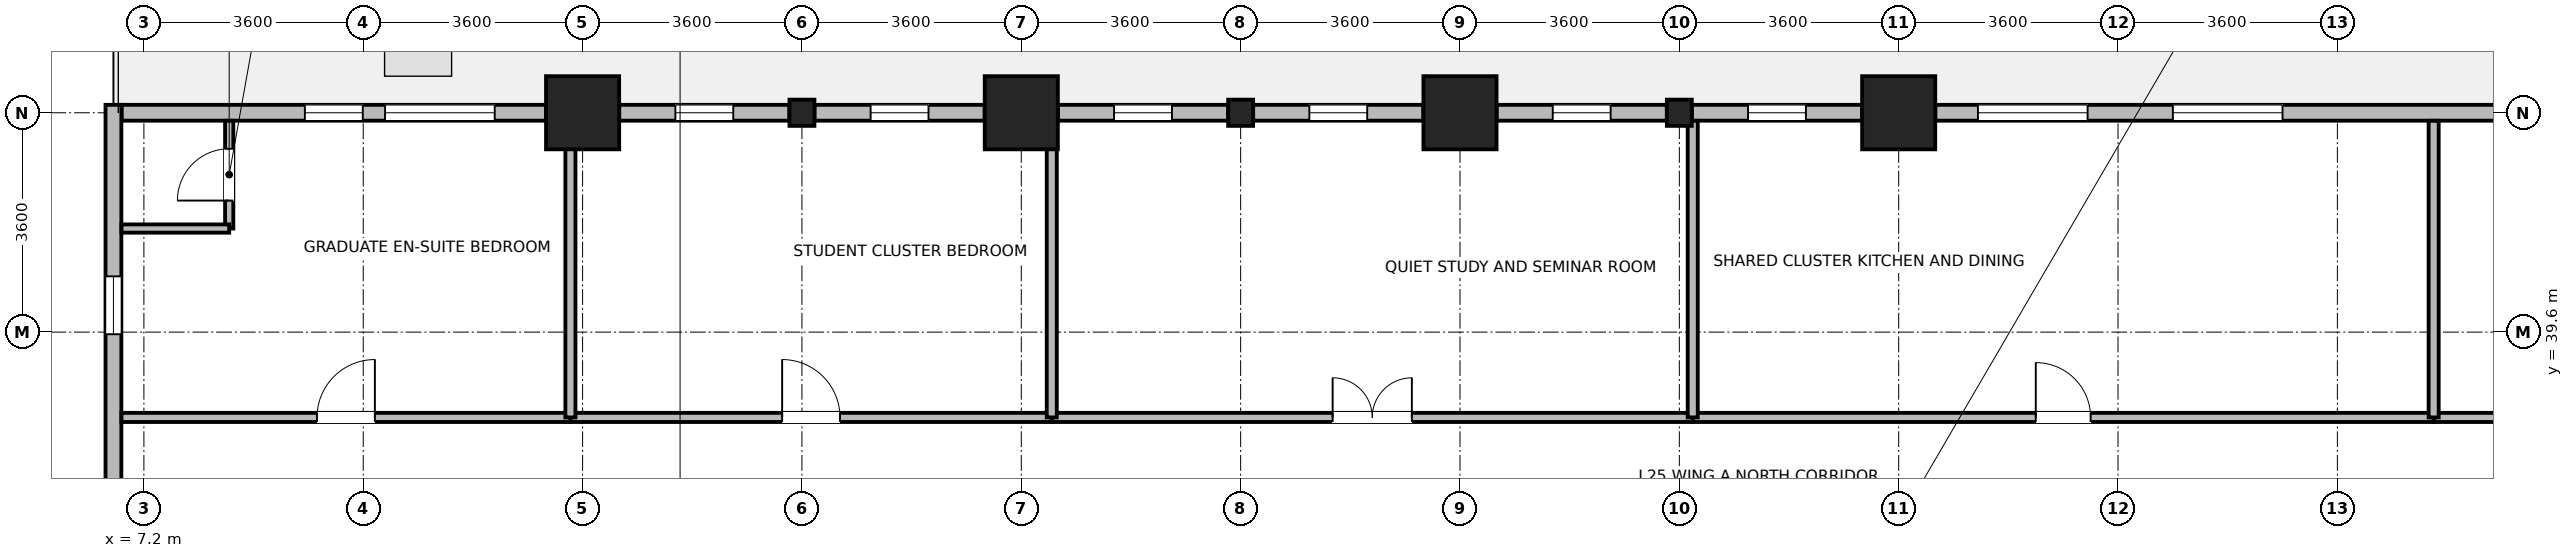
"""IFC4 building model, lengths in metres.
Left out: names, types, materials, properties, quantities, classifications, styles, units other than length and angle.
Written with IfcOpenShell. Run it as: python <this file> out.ifc"""

import sys

from ifc_helpers import new_model, si_unit, direction, frame, frame_2d, origin, origin_2d, place, context, subcontext, project, spatial, rectangle, i_section, extrude, source, transform, mapped, element, fill, save


model = new_model("IFC4")
c1 = context("Model", 3, precision=1e-05, world=origin(), true_north=direction((0.0, 1.0)))
c2 = subcontext(c1, "Body", "Model", "MODEL_VIEW")
j1 = project(units=[si_unit("LENGTHUNIT", "METRE"), si_unit("PLANEANGLEUNIT", "RADIAN")], contexts=[c1])
p1 = place(None, origin())
s1 = spatial("IfcSite", under=j1, at=p1, CompositionType="ELEMENT")
p2 = place(p1, origin())
s2 = spatial("IfcBuilding", under=s1, at=p2, CompositionType="ELEMENT")
p3 = place(p2, frame((0.0, 0.0, 100.8)))
s3 = spatial("IfcBuildingStorey", under=s2, at=p3, CompositionType="ELEMENT", Elevation=100.8)
m1 = source(origin(), c2, "Body", "SweptSolid", [
    extrude(rectangle(XDim=1.2, YDim=1.2, at=origin_2d()), origin(), (0.0, 0.0, 1.0), 3.7),
])
for number, where, z_axis, x_axis in (
    (1, (14.4, 43.2, 0.0), (0.0, 0.0, 1.0), (1.0, 0.0, 0.0)),
    (2, (21.6, 43.2, 0.0), (0.0, 0.0, 1.0), (1.0, 0.0, 0.0)),
    (3, (28.8, 43.2, 0.0), (0.0, 0.0, 1.0), (1.0, 0.0, 0.0)),
    (4, (36.0, 43.2, 0.0), (0.0, 0.0, 1.0), (1.0, 0.0, 0.0)),
):
    element("IfcColumn", number, at=place(p3, frame(where, z_axis=z_axis, x_axis=x_axis)), inside=s3, PredefinedType="COLUMN", context=c2, shape_type="MappedRepresentation", body=[
        mapped(m1, transform((0.0, 0.0, 0.0), x_axis=(1.0, 0.0, 0.0), y_axis=(0.0, 1.0, 0.0), z_axis=(0.0, 0.0, 1.0), scale=1.0)),
    ])
m2 = source(origin(), c2, "Body", "SweptSolid", [
    extrude(i_section(OverallWidth=0.409, OverallDepth=0.43, WebThickness=0.024, FlangeThickness=0.033, FilletRadius=0.015, at=origin_2d()), origin(), (0.0, 0.0, 1.0), 3.7),
])
for number, where, z_axis, x_axis in (
    (5, (18.0, 43.2, 0.0), (0.0, 0.0, 1.0), (1.0, 0.0, 0.0)),
    (6, (25.2, 43.2, 0.0), (0.0, 0.0, 1.0), (1.0, 0.0, 0.0)),
    (7, (32.4, 43.2, 0.0), (0.0, 0.0, 1.0), (1.0, 0.0, 0.0)),
):
    element("IfcColumn", number, at=place(p3, frame(where, z_axis=z_axis, x_axis=x_axis)), inside=s3, PredefinedType="COLUMN", context=c2, shape_type="MappedRepresentation", body=[
        mapped(m2, transform((0.0, 0.0, 0.0), x_axis=(1.0, 0.0, 0.0), y_axis=(0.0, 1.0, 0.0), z_axis=(0.0, 0.0, 1.0), scale=1.0)),
    ])
p4 = place(p3, frame((36.601, 43.2, 0.0), z_axis=(0.0, 0.0, 1.0), x_axis=(1.0, 0.0, 0.0)))
e8 = element("IfcWall", 8, at=p4, inside=s3, PredefinedType="STANDARD", context=c2, shape_type="SweptSolid", body=[
    extrude(rectangle(XDim=9.598, YDim=0.26, at=frame_2d((4.799, 0.0))), origin(), (0.0, 0.0, 1.0), 2.98),
])
p5 = place(p4, frame((0.7, 0.0, 0.85)))
e9 = element("IfcOpeningElement", 9, at=p5, cuts=e8, PredefinedType="OPENING", context=c2, shape_type="SweptSolid", body=[
    extrude(rectangle(XDim=1.8, YDim=1.85, at=frame_2d((0.9, 0.925))), frame((0.0, 0.14, 0.0), z_axis=(0.0, -1.0, 0.0), x_axis=(1.0, 0.0, 0.0)), (0.0, 0.0, 1.0), 0.28),
])
p6 = place(p4, frame((3.899, 0.0, 0.85)))
e10 = element("IfcOpeningElement", 10, at=p6, cuts=e8, PredefinedType="OPENING", context=c2, shape_type="SweptSolid", body=[
    extrude(rectangle(XDim=1.8, YDim=1.85, at=frame_2d((0.9, 0.925))), frame((0.0, 0.14, 0.0), z_axis=(0.0, -1.0, 0.0), x_axis=(1.0, 0.0, 0.0)), (0.0, 0.0, 1.0), 0.28),
])
p7 = place(p3, frame((32.605, 43.2, 0.0), z_axis=(0.0, 0.0, 1.0), x_axis=(1.0, 0.0, 0.0)))
e11 = element("IfcWall", 11, at=p7, inside=s3, PredefinedType="STANDARD", context=c2, shape_type="SweptSolid", body=[
    extrude(rectangle(XDim=2.793, YDim=0.26, at=frame_2d((1.397, 0.0))), origin(), (0.0, 0.0, 1.0), 2.98),
])
p8 = place(p7, frame((0.922, 0.0, 0.85)))
e12 = element("IfcOpeningElement", 12, at=p8, cuts=e11, PredefinedType="OPENING", context=c2, shape_type="SweptSolid", body=[
    extrude(rectangle(XDim=0.95, YDim=1.75, at=frame_2d((0.475, 0.875))), frame((0.0, 0.14, 0.0), z_axis=(0.0, -1.0, 0.0), x_axis=(1.0, 0.0, 0.0)), (0.0, 0.0, 1.0), 0.28),
])
p9 = place(p3, frame((29.401, 43.2, 0.0), z_axis=(0.0, 0.0, 1.0), x_axis=(1.0, 0.0, 0.0)))
e13 = element("IfcWall", 13, at=p9, inside=s3, PredefinedType="STANDARD", context=c2, shape_type="SweptSolid", body=[
    extrude(rectangle(XDim=2.794, YDim=0.26, at=frame_2d((1.397, 0.0))), origin(), (0.0, 0.0, 1.0), 2.98),
])
p10 = place(p9, frame((0.922, 0.0, 0.85)))
e14 = element("IfcOpeningElement", 14, at=p10, cuts=e13, PredefinedType="OPENING", context=c2, shape_type="SweptSolid", body=[
    extrude(rectangle(XDim=0.95, YDim=1.75, at=frame_2d((0.475, 0.875))), frame((0.0, 0.14, 0.0), z_axis=(0.0, -1.0, 0.0), x_axis=(1.0, 0.0, 0.0)), (0.0, 0.0, 1.0), 0.28),
])
p11 = place(p3, frame((25.406, 43.2, 0.0), z_axis=(0.0, 0.0, 1.0), x_axis=(1.0, 0.0, 0.0)))
e15 = element("IfcWall", 15, at=p11, inside=s3, PredefinedType="STANDARD", context=c2, shape_type="SweptSolid", body=[
    extrude(rectangle(XDim=2.793, YDim=0.26, at=frame_2d((1.397, 0.0))), origin(), (0.0, 0.0, 1.0), 2.98),
])
p12 = place(p11, frame((0.922, 0.0, 0.85)))
e16 = element("IfcOpeningElement", 16, at=p12, cuts=e15, PredefinedType="OPENING", context=c2, shape_type="SweptSolid", body=[
    extrude(rectangle(XDim=0.95, YDim=1.75, at=frame_2d((0.475, 0.875))), frame((0.0, 0.14, 0.0), z_axis=(0.0, -1.0, 0.0), x_axis=(1.0, 0.0, 0.0)), (0.0, 0.0, 1.0), 0.28),
])
p13 = place(p3, frame((22.201, 43.2, 0.0), z_axis=(0.0, 0.0, 1.0), x_axis=(1.0, 0.0, 0.0)))
e17 = element("IfcWall", 17, at=p13, inside=s3, PredefinedType="STANDARD", context=c2, shape_type="SweptSolid", body=[
    extrude(rectangle(XDim=2.793, YDim=0.26, at=frame_2d((1.397, 0.0))), origin(), (0.0, 0.0, 1.0), 2.98),
])
p14 = place(p13, frame((0.922, 0.0, 0.85)))
e18 = element("IfcOpeningElement", 18, at=p14, cuts=e17, PredefinedType="OPENING", context=c2, shape_type="SweptSolid", body=[
    extrude(rectangle(XDim=0.95, YDim=1.75, at=frame_2d((0.475, 0.875))), frame((0.0, 0.14, 0.0), z_axis=(0.0, -1.0, 0.0), x_axis=(1.0, 0.0, 0.0)), (0.0, 0.0, 1.0), 0.28),
])
p15 = place(p3, frame((18.206, 43.2, 0.0), z_axis=(0.0, 0.0, 1.0), x_axis=(1.0, 0.0, 0.0)))
e19 = element("IfcWall", 19, at=p15, inside=s3, PredefinedType="STANDARD", context=c2, shape_type="SweptSolid", body=[
    extrude(rectangle(XDim=2.793, YDim=0.26, at=frame_2d((1.397, 0.0))), origin(), (0.0, 0.0, 1.0), 2.98),
])
p16 = place(p15, frame((0.922, 0.0, 0.85)))
e20 = element("IfcOpeningElement", 20, at=p16, cuts=e19, PredefinedType="OPENING", context=c2, shape_type="SweptSolid", body=[
    extrude(rectangle(XDim=0.95, YDim=1.75, at=frame_2d((0.475, 0.875))), frame((0.0, 0.14, 0.0), z_axis=(0.0, -1.0, 0.0), x_axis=(1.0, 0.0, 0.0)), (0.0, 0.0, 1.0), 0.28),
])
p17 = place(p3, frame((15.001, 43.2, 0.0), z_axis=(0.0, 0.0, 1.0), x_axis=(1.0, 0.0, 0.0)))
e21 = element("IfcWall", 21, at=p17, inside=s3, PredefinedType="STANDARD", context=c2, shape_type="SweptSolid", body=[
    extrude(rectangle(XDim=2.793, YDim=0.26, at=frame_2d((1.397, 0.0))), origin(), (0.0, 0.0, 1.0), 2.98),
])
p18 = place(p17, frame((0.922, 0.0, 0.85)))
e22 = element("IfcOpeningElement", 22, at=p18, cuts=e21, PredefinedType="OPENING", context=c2, shape_type="SweptSolid", body=[
    extrude(rectangle(XDim=0.95, YDim=1.75, at=frame_2d((0.475, 0.875))), frame((0.0, 0.14, 0.0), z_axis=(0.0, -1.0, 0.0), x_axis=(1.0, 0.0, 0.0)), (0.0, 0.0, 1.0), 0.28),
])
p19 = place(p3, frame((6.835, 43.2, 0.0), z_axis=(0.0, 0.0, 1.0), x_axis=(1.0, 0.0, 0.0)))
e23 = element("IfcWall", 23, at=p19, inside=s3, PredefinedType="STANDARD", context=c2, shape_type="SweptSolid", body=[
    extrude(rectangle(XDim=6.964, YDim=0.26, at=frame_2d((3.482, 0.0))), origin(), (0.0, 0.0, 1.0), 3.43),
])
p20 = place(p19, frame((4.323, 0.0, 0.85)))
e24 = element("IfcOpeningElement", 24, at=p20, cuts=e23, PredefinedType="OPENING", context=c2, shape_type="SweptSolid", body=[
    extrude(rectangle(XDim=1.8, YDim=1.85, at=frame_2d((0.9, 0.925))), frame((0.0, 0.14, 0.0), z_axis=(0.0, -1.0, 0.0), x_axis=(1.0, 0.0, 0.0)), (0.0, 0.0, 1.0), 0.28),
])
p21 = place(p19, frame((3.007, 0.0, 0.85)))
e25 = element("IfcOpeningElement", 25, at=p21, cuts=e23, PredefinedType="OPENING", context=c2, shape_type="SweptSolid", body=[
    extrude(rectangle(XDim=0.95, YDim=1.75, at=frame_2d((0.475, 0.875))), frame((0.0, 0.14, 0.0), z_axis=(0.0, -1.0, 0.0), x_axis=(1.0, 0.0, 0.0)), (0.0, 0.0, 1.0), 0.28),
])
p22 = place(p3, frame((6.7, 36.751, 0.0), z_axis=(0.0, 0.0, 1.0), x_axis=(0.0, 1.0, 0.0)))
e26 = element("IfcWall", 26, at=p22, inside=s3, PredefinedType="STANDARD", context=c2, shape_type="SweptSolid", body=[
    extrude(rectangle(XDim=6.579, YDim=0.26, at=frame_2d((3.29, 0.0))), origin(), (0.0, 0.0, 1.0), 3.43),
])
p23 = place(p22, frame((2.814, 0.0, 0.85)))
e27 = element("IfcOpeningElement", 27, at=p23, cuts=e26, PredefinedType="OPENING", context=c2, shape_type="SweptSolid", body=[
    extrude(rectangle(XDim=0.95, YDim=1.75, at=frame_2d((0.475, 0.875))), frame((0.0, 0.14, 0.0), z_axis=(0.0, -1.0, 0.0), x_axis=(1.0, 0.0, 0.0)), (0.0, 0.0, 1.0), 0.28),
])
p24 = place(p3, frame((8.6, 41.3, 0.0), z_axis=(0.0, 0.0, 1.0), x_axis=(0.0, 1.0, 0.0)))
e28 = element("IfcWall", 28, at=p24, inside=s3, PredefinedType="PARTITIONING", context=c2, shape_type="SweptSolid", body=[
    extrude(rectangle(XDim=1.768, YDim=0.135, at=frame_2d((0.884, 0.0))), origin(), (0.0, 0.0, 1.0), 3.43),
])
p25 = place(p24, frame((0.459, 0.0, 0.0)))
e29 = element("IfcOpeningElement", 29, at=p25, cuts=e28, PredefinedType="OPENING", context=c2, shape_type="SweptSolid", body=[
    extrude(rectangle(XDim=0.85, YDim=2.04, at=frame_2d((0.425, 1.02))), frame((0.0, 0.078, 0.0), z_axis=(0.0, -1.0, 0.0), x_axis=(1.0, 0.0, 0.0)), (0.0, 0.0, 1.0), 0.155),
])
p26 = place(p3, frame((6.832, 41.3, 0.0), z_axis=(0.0, 0.0, 1.0), x_axis=(1.0, 0.0, 0.0)))
e30 = element("IfcWall", 30, at=p26, inside=s3, PredefinedType="PARTITIONING", context=c2, shape_type="SweptSolid", body=[
    extrude(rectangle(XDim=1.768, YDim=0.135, at=frame_2d((0.884, 0.0))), origin(), (0.0, 0.0, 1.0), 3.43),
])
p27 = place(p3, frame((44.78, 38.2, 0.0), z_axis=(0.0, 0.0, 1.0), x_axis=(1.0, 0.0, 0.0)))
e31 = element("IfcWall", 31, at=p27, inside=s3, PredefinedType="PARTITIONING", context=c2, shape_type="SweptSolid", body=[
    extrude(rectangle(XDim=14.06, YDim=0.15, at=frame_2d((7.03, 0.0))), origin(), (0.0, 0.0, 1.0), 3.43),
])
p28 = place(p27, frame((6.38, 0.0, 0.0)))
e32 = element("IfcOpeningElement", 32, at=p28, cuts=e31, PredefinedType="OPENING", context=c2, shape_type="SweptSolid", body=[
    extrude(rectangle(XDim=1.3, YDim=2.12, at=frame_2d((0.65, 1.06))), frame((0.0, 0.085, 0.0), z_axis=(0.0, -1.0, 0.0), x_axis=(1.0, 0.0, 0.0)), (0.0, 0.0, 1.0), 0.17),
])
p29 = place(p3, frame((32.62, 38.2, 0.0), z_axis=(0.0, 0.0, 1.0), x_axis=(1.0, 0.0, 0.0)))
e33 = element("IfcWall", 33, at=p29, inside=s3, PredefinedType="PARTITIONING", context=c2, shape_type="SweptSolid", body=[
    extrude(rectangle(XDim=12.16, YDim=0.15, at=frame_2d((6.08, 0.0))), origin(), (0.0, 0.0, 1.0), 3.43),
])
p30 = place(p29, frame((5.63, 0.0, 0.0)))
e34 = element("IfcOpeningElement", 34, at=p30, cuts=e33, PredefinedType="OPENING", context=c2, shape_type="SweptSolid", body=[
    extrude(rectangle(XDim=0.9, YDim=2.08, at=frame_2d((0.45, 1.04))), frame((0.0, 0.085, 0.0), z_axis=(0.0, -1.0, 0.0), x_axis=(1.0, 0.0, 0.0)), (0.0, 0.0, 1.0), 0.17),
])
p31 = place(p3, frame((22.1, 38.2, 0.0), z_axis=(0.0, 0.0, 1.0), x_axis=(1.0, 0.0, 0.0)))
e35 = element("IfcWall", 35, at=p31, inside=s3, PredefinedType="PARTITIONING", context=c2, shape_type="SweptSolid", body=[
    extrude(rectangle(XDim=10.52, YDim=0.15, at=frame_2d((5.26, 0.0))), origin(), (0.0, 0.0, 1.0), 3.43),
])
p32 = place(p31, frame((4.61, 0.0, 0.0)))
e36 = element("IfcOpeningElement", 36, at=p32, cuts=e35, PredefinedType="OPENING", context=c2, shape_type="SweptSolid", body=[
    extrude(rectangle(XDim=1.3, YDim=2.12, at=frame_2d((0.65, 1.06))), frame((0.0, 0.085, 0.0), z_axis=(0.0, -1.0, 0.0), x_axis=(1.0, 0.0, 0.0)), (0.0, 0.0, 1.0), 0.17),
])
p33 = place(p3, frame((14.2, 38.2, 0.0), z_axis=(0.0, 0.0, 1.0), x_axis=(1.0, 0.0, 0.0)))
e37 = element("IfcWall", 37, at=p33, inside=s3, PredefinedType="PARTITIONING", context=c2, shape_type="SweptSolid", body=[
    extrude(rectangle(XDim=7.9, YDim=0.15, at=frame_2d((3.95, 0.0))), origin(), (0.0, 0.0, 1.0), 3.43),
])
p34 = place(p33, frame((3.475, 0.0, 0.0)))
e38 = element("IfcOpeningElement", 38, at=p34, cuts=e37, PredefinedType="OPENING", context=c2, shape_type="SweptSolid", body=[
    extrude(rectangle(XDim=0.95, YDim=2.1, at=frame_2d((0.475, 1.05))), frame((0.0, 0.085, 0.0), z_axis=(0.0, -1.0, 0.0), x_axis=(1.0, 0.0, 0.0)), (0.0, 0.0, 1.0), 0.17),
])
p35 = place(p3, frame((6.832, 38.2, 0.0), z_axis=(0.0, 0.0, 1.0), x_axis=(1.0, 0.0, 0.0)))
e39 = element("IfcWall", 39, at=p35, inside=s3, PredefinedType="PARTITIONING", context=c2, shape_type="SweptSolid", body=[
    extrude(rectangle(XDim=7.368, YDim=0.15, at=frame_2d((3.684, 0.0))), origin(), (0.0, 0.0, 1.0), 3.43),
])
p36 = place(p35, frame((3.209, 0.0, 0.0)))
e40 = element("IfcOpeningElement", 40, at=p36, cuts=e39, PredefinedType="OPENING", context=c2, shape_type="SweptSolid", body=[
    extrude(rectangle(XDim=0.95, YDim=2.1, at=frame_2d((0.475, 1.05))), frame((0.0, 0.085, 0.0), z_axis=(0.0, -1.0, 0.0), x_axis=(1.0, 0.0, 0.0)), (0.0, 0.0, 1.0), 0.17),
])
p37 = place(p3, frame((14.2, 38.2, 0.0), z_axis=(0.0, 0.0, 1.0), x_axis=(0.0, 1.0, 0.0)))
e41 = element("IfcWall", 41, at=p37, inside=s3, PredefinedType="PARTITIONING", context=c2, shape_type="SweptSolid", body=[
    extrude(rectangle(XDim=4.868, YDim=0.165, at=frame_2d((2.434, 0.0))), origin(), (0.0, 0.0, 1.0), 2.93),
])
p38 = place(p3, frame((22.1, 38.2, 0.0), z_axis=(0.0, 0.0, 1.0), x_axis=(0.0, 1.0, 0.0)))
e42 = element("IfcWall", 42, at=p38, inside=s3, PredefinedType="PARTITIONING", context=c2, shape_type="SweptSolid", body=[
    extrude(rectangle(XDim=4.868, YDim=0.165, at=frame_2d((2.434, 0.0))), origin(), (0.0, 0.0, 1.0), 3.43),
])
p39 = place(p3, frame((32.62, 38.2, 0.0), z_axis=(0.0, 0.0, 1.0), x_axis=(0.0, 1.0, 0.0)))
e43 = element("IfcWall", 43, at=p39, inside=s3, PredefinedType="PARTITIONING", context=c2, shape_type="SweptSolid", body=[
    extrude(rectangle(XDim=4.868, YDim=0.165, at=frame_2d((2.434, 0.0))), origin(), (0.0, 0.0, 1.0), 3.1),
])
p40 = place(p3, frame((44.78, 38.2, 0.0), z_axis=(0.0, 0.0, 1.0), x_axis=(0.0, 1.0, 0.0)))
e44 = element("IfcWall", 44, at=p40, inside=s3, PredefinedType="PARTITIONING", context=c2, shape_type="SweptSolid", body=[
    extrude(rectangle(XDim=4.868, YDim=0.165, at=frame_2d((2.434, 0.0))), origin(), (0.0, 0.0, 1.0), 3.43),
])
p41 = place(p5, origin())
e45 = element("IfcWindow", 45, at=p41, inside=s3, PartitioningType="SINGLE_PANEL", PredefinedType="WINDOW", context=c2, shape_type="SweptSolid", body=[
    extrude(rectangle(XDim=1.8, YDim=1.85, at=frame_2d((0.9, 0.925))), frame((0.0, 0.03, 0.0), z_axis=(0.0, -1.0, 0.0), x_axis=(1.0, 0.0, 0.0)), (0.0, 0.0, 1.0), 0.06),
])
fill(e9, e45)
p42 = place(p6, origin())
e46 = element("IfcWindow", 46, at=p42, inside=s3, PartitioningType="SINGLE_PANEL", PredefinedType="WINDOW", context=c2, shape_type="SweptSolid", body=[
    extrude(rectangle(XDim=1.8, YDim=1.85, at=frame_2d((0.9, 0.925))), frame((0.0, 0.03, 0.0), z_axis=(0.0, -1.0, 0.0), x_axis=(1.0, 0.0, 0.0)), (0.0, 0.0, 1.0), 0.06),
])
fill(e10, e46)
p43 = place(p8, origin())
e47 = element("IfcWindow", 47, at=p43, inside=s3, PartitioningType="SINGLE_PANEL", PredefinedType="WINDOW", context=c2, shape_type="SweptSolid", body=[
    extrude(rectangle(XDim=0.95, YDim=1.75, at=frame_2d((0.475, 0.875))), frame((0.0, 0.03, 0.0), z_axis=(0.0, -1.0, 0.0), x_axis=(1.0, 0.0, 0.0)), (0.0, 0.0, 1.0), 0.06),
])
fill(e12, e47)
p44 = place(p10, origin())
e48 = element("IfcWindow", 48, at=p44, inside=s3, PartitioningType="SINGLE_PANEL", PredefinedType="WINDOW", context=c2, shape_type="SweptSolid", body=[
    extrude(rectangle(XDim=0.95, YDim=1.75, at=frame_2d((0.475, 0.875))), frame((0.0, 0.03, 0.0), z_axis=(0.0, -1.0, 0.0), x_axis=(1.0, 0.0, 0.0)), (0.0, 0.0, 1.0), 0.06),
])
fill(e14, e48)
p45 = place(p12, origin())
e49 = element("IfcWindow", 49, at=p45, inside=s3, PartitioningType="SINGLE_PANEL", PredefinedType="WINDOW", context=c2, shape_type="SweptSolid", body=[
    extrude(rectangle(XDim=0.95, YDim=1.75, at=frame_2d((0.475, 0.875))), frame((0.0, 0.03, 0.0), z_axis=(0.0, -1.0, 0.0), x_axis=(1.0, 0.0, 0.0)), (0.0, 0.0, 1.0), 0.06),
])
fill(e16, e49)
p46 = place(p14, origin())
e50 = element("IfcWindow", 50, at=p46, inside=s3, PartitioningType="SINGLE_PANEL", PredefinedType="WINDOW", context=c2, shape_type="SweptSolid", body=[
    extrude(rectangle(XDim=0.95, YDim=1.75, at=frame_2d((0.475, 0.875))), frame((0.0, 0.03, 0.0), z_axis=(0.0, -1.0, 0.0), x_axis=(1.0, 0.0, 0.0)), (0.0, 0.0, 1.0), 0.06),
])
fill(e18, e50)
p47 = place(p16, origin())
e51 = element("IfcWindow", 51, at=p47, inside=s3, PartitioningType="SINGLE_PANEL", PredefinedType="WINDOW", context=c2, shape_type="SweptSolid", body=[
    extrude(rectangle(XDim=0.95, YDim=1.75, at=frame_2d((0.475, 0.875))), frame((0.0, 0.03, 0.0), z_axis=(0.0, -1.0, 0.0), x_axis=(1.0, 0.0, 0.0)), (0.0, 0.0, 1.0), 0.06),
])
fill(e20, e51)
p48 = place(p18, origin())
e52 = element("IfcWindow", 52, at=p48, inside=s3, PartitioningType="SINGLE_PANEL", PredefinedType="WINDOW", context=c2, shape_type="SweptSolid", body=[
    extrude(rectangle(XDim=0.95, YDim=1.75, at=frame_2d((0.475, 0.875))), frame((0.0, 0.03, 0.0), z_axis=(0.0, -1.0, 0.0), x_axis=(1.0, 0.0, 0.0)), (0.0, 0.0, 1.0), 0.06),
])
fill(e22, e52)
p49 = place(p20, origin())
e53 = element("IfcWindow", 53, at=p49, inside=s3, PartitioningType="SINGLE_PANEL", PredefinedType="WINDOW", context=c2, shape_type="SweptSolid", body=[
    extrude(rectangle(XDim=1.8, YDim=1.85, at=frame_2d((0.9, 0.925))), frame((0.0, 0.03, 0.0), z_axis=(0.0, -1.0, 0.0), x_axis=(1.0, 0.0, 0.0)), (0.0, 0.0, 1.0), 0.06),
])
fill(e24, e53)
p50 = place(p21, origin())
e54 = element("IfcWindow", 54, at=p50, inside=s3, PartitioningType="SINGLE_PANEL", PredefinedType="WINDOW", context=c2, shape_type="SweptSolid", body=[
    extrude(rectangle(XDim=0.95, YDim=1.75, at=frame_2d((0.475, 0.875))), frame((0.0, 0.03, 0.0), z_axis=(0.0, -1.0, 0.0), x_axis=(1.0, 0.0, 0.0)), (0.0, 0.0, 1.0), 0.06),
])
fill(e25, e54)
p51 = place(p23, origin())
e55 = element("IfcWindow", 55, at=p51, inside=s3, PartitioningType="SINGLE_PANEL", PredefinedType="WINDOW", context=c2, shape_type="SweptSolid", body=[
    extrude(rectangle(XDim=0.95, YDim=1.75, at=frame_2d((0.475, 0.875))), frame((0.0, 0.03, 0.0), z_axis=(0.0, -1.0, 0.0), x_axis=(1.0, 0.0, 0.0)), (0.0, 0.0, 1.0), 0.06),
])
fill(e27, e55)
p52 = place(p25, origin())
e56 = element("IfcDoor", 56, at=p52, inside=s3, OperationType="SINGLE_SWING_LEFT", PredefinedType="DOOR", context=c2, shape_type="SweptSolid", body=[
    extrude(rectangle(XDim=0.85, YDim=2.04, at=frame_2d((0.425, 1.02))), frame((0.0, 0.025, 0.0), z_axis=(0.0, -1.0, 0.0), x_axis=(1.0, 0.0, 0.0)), (0.0, 0.0, 1.0), 0.05),
])
fill(e29, e56)
p53 = place(p30, origin())
e57 = element("IfcDoor", 57, at=p53, inside=s3, OperationType="SINGLE_SWING_LEFT", PredefinedType="DOOR", context=c2, shape_type="SweptSolid", body=[
    extrude(rectangle(XDim=0.9, YDim=2.08, at=frame_2d((0.45, 1.04))), frame((0.0, 0.025, 0.0), z_axis=(0.0, -1.0, 0.0), x_axis=(1.0, 0.0, 0.0)), (0.0, 0.0, 1.0), 0.05),
])
fill(e34, e57)
p54 = place(p32, origin())
e58 = element("IfcDoor", 58, at=p54, inside=s3, OperationType="DOUBLE_DOOR_SINGLE_SWING", PredefinedType="DOOR", context=c2, shape_type="SweptSolid", body=[
    extrude(rectangle(XDim=1.3, YDim=2.12, at=frame_2d((0.65, 1.06))), frame((0.0, 0.025, 0.0), z_axis=(0.0, -1.0, 0.0), x_axis=(1.0, 0.0, 0.0)), (0.0, 0.0, 1.0), 0.05),
])
fill(e36, e58)
p55 = place(p34, origin())
e59 = element("IfcDoor", 59, at=p55, inside=s3, OperationType="SINGLE_SWING_LEFT", PredefinedType="DOOR", context=c2, shape_type="SweptSolid", body=[
    extrude(rectangle(XDim=0.95, YDim=2.1, at=frame_2d((0.475, 1.05))), frame((0.0, 0.025, 0.0), z_axis=(0.0, -1.0, 0.0), x_axis=(1.0, 0.0, 0.0)), (0.0, 0.0, 1.0), 0.05),
])
fill(e38, e59)
p56 = place(p36, origin())
e60 = element("IfcDoor", 60, at=p56, inside=s3, OperationType="SINGLE_SWING_RIGHT", PredefinedType="DOOR", context=c2, shape_type="SweptSolid", body=[
    extrude(rectangle(XDim=0.95, YDim=2.1, at=frame_2d((0.475, 1.05))), frame((0.0, 0.025, 0.0), z_axis=(0.0, -1.0, 0.0), x_axis=(1.0, 0.0, 0.0)), (0.0, 0.0, 1.0), 0.05),
])
fill(e40, e60)
save(model, sys.argv[1])
